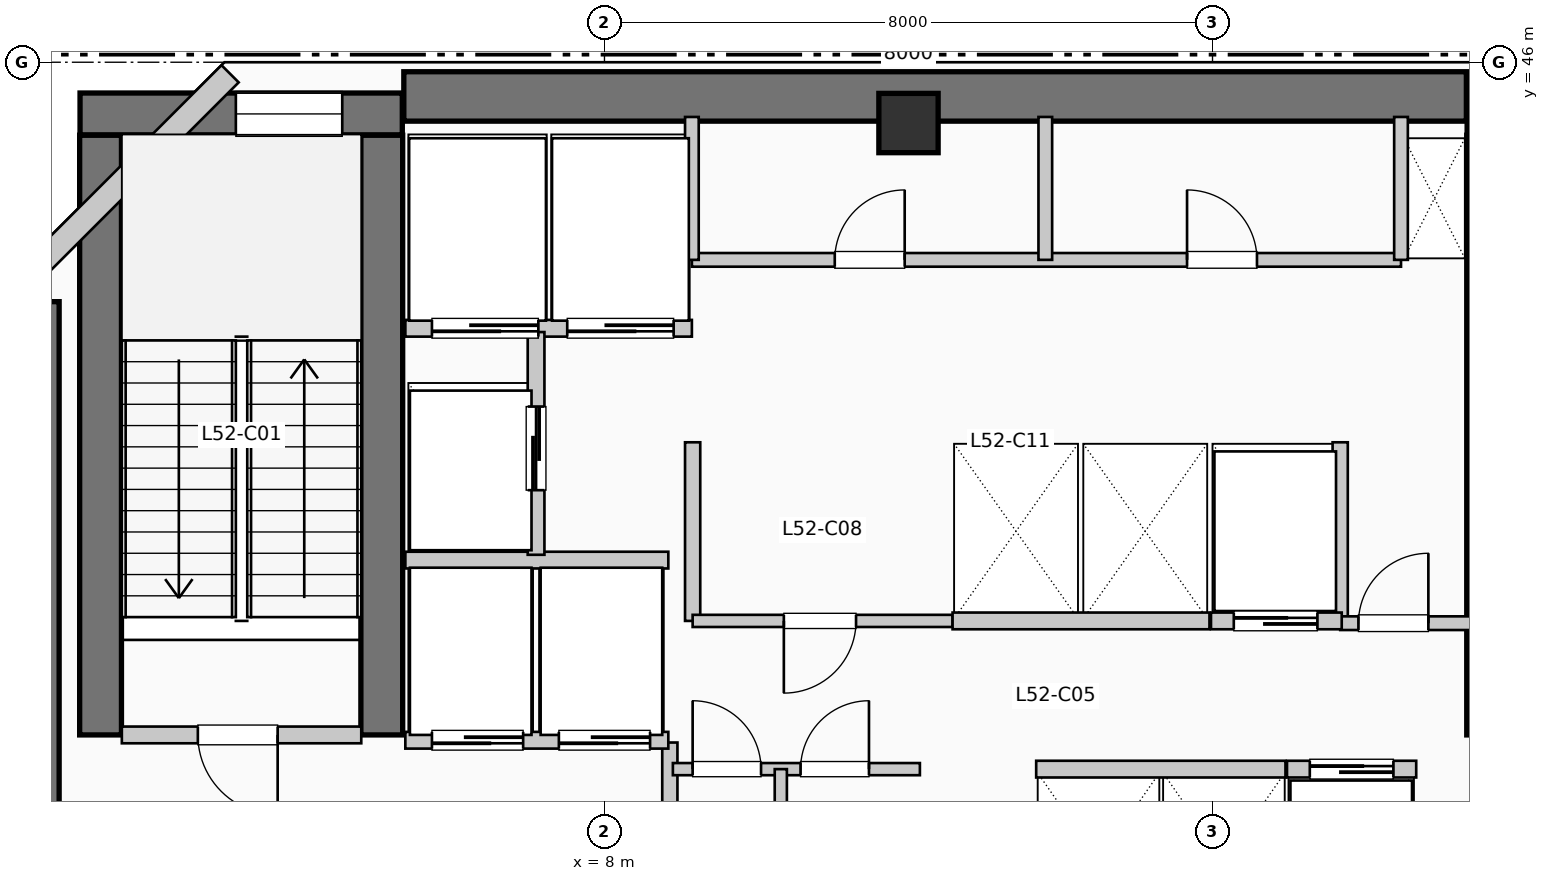
"""IFC4 building model, lengths in metres.
Left out: names, types, materials, properties, quantities, classifications, styles, units other than length and angle.
Written with IfcOpenShell. Run it as: python <this file> out.ifc"""

import sys

from ifc_helpers import new_model, si_unit, direction, frame, frame_2d, origin, origin_2d, place, context, subcontext, project, spatial, rectangle, extrude, element, fill, save


model = new_model("IFC4")
c1 = context("Model", 3, precision=1e-05, world=origin(), true_north=direction((0.0, 1.0)))
c2 = subcontext(c1, "Body", "Model", "MODEL_VIEW")
j1 = project(units=[si_unit("LENGTHUNIT", "METRE"), si_unit("PLANEANGLEUNIT", "RADIAN")], contexts=[c1])
p1 = place(None, origin())
s1 = spatial("IfcSite", under=j1, at=p1, CompositionType="ELEMENT")
p2 = place(p1, origin())
s2 = spatial("IfcBuilding", under=s1, at=p2, CompositionType="ELEMENT")
p3 = place(p2, frame((0.0, 0.0, 215.16)))
s3 = spatial("IfcBuildingStorey", under=s2, at=p3, CompositionType="ELEMENT", Elevation=215.16)
p4 = place(p3, frame((5.36, 45.55, 0.0), z_axis=(0.0, 0.0, 1.0), x_axis=(1.0, 0.0, 0.0)))
e1 = element("IfcWall", 1, at=p4, inside=s3, PredefinedType="SHEAR", context=c2, shape_type="SweptSolid", body=[
    extrude(rectangle(XDim=13.98, YDim=0.65, at=frame_2d((6.99, 0.0))), origin(), (0.0, 0.0, 1.0), 4.62),
])
p5 = place(p3, frame((0.5, 34.95, 0.0), z_axis=(0.0, 0.0, 1.0), x_axis=(0.0, 1.0, 0.0)))
e2 = element("IfcWall", 2, at=p5, inside=s3, PredefinedType="SHEAR", context=c2, shape_type="SweptSolid", body=[
    extrude(rectangle(XDim=7.9, YDim=0.65, at=frame_2d((3.95, 0.0))), origin(), (0.0, 0.0, 1.0), 4.62),
])
for number, where, z_axis, x_axis in (
    (3, (1.37, 37.15, 0.0), (0.0, 0.0, 1.0), (0.0, 1.0, 0.0)),
    (4, (5.07, 37.15, 0.0), (0.0, 0.0, 1.0), (0.0, 1.0, 0.0)),
):
    element("IfcWall", number, at=place(p3, frame(where, z_axis=z_axis, x_axis=x_axis)), inside=s3, PredefinedType="SHEAR", context=c2, shape_type="SweptSolid", body=[
        extrude(rectangle(XDim=7.89, YDim=0.55, at=frame_2d((3.945, 0.0))), origin(), (0.0, 0.0, 1.0), 4.62),
    ])
p6 = place(p3, frame((1.1, 45.32, 0.0), z_axis=(0.0, 0.0, 1.0), x_axis=(1.0, 0.0, 0.0)))
e5 = element("IfcWall", 5, at=p6, inside=s3, PredefinedType="SHEAR", context=c2, shape_type="SweptSolid", body=[
    extrude(rectangle(XDim=4.24, YDim=0.55, at=frame_2d((2.12, 0.0))), origin(), (0.0, 0.0, 1.0), 4.62),
])
p7 = place(p6, frame((2.05, 0.0, 1.05)))
e6 = element("IfcOpeningElement", 6, at=p7, cuts=e5, PredefinedType="OPENING", context=c2, shape_type="SweptSolid", body=[
    extrude(rectangle(XDim=1.4, YDim=1.8, at=frame_2d((0.7, 0.9))), frame((0.0, 0.285, 0.0), z_axis=(0.0, -1.0, 0.0), x_axis=(1.0, 0.0, 0.0)), (0.0, 0.0, 1.0), 0.57),
])
p8 = place(p3, frame((19.62, 37.15, 0.0), z_axis=(0.0, 0.0, 1.0), x_axis=(0.0, 1.0, 0.0)))
e7 = element("IfcWall", 7, at=p8, inside=s3, PredefinedType="SHEAR", context=c2, shape_type="SweptSolid", body=[
    extrude(rectangle(XDim=7.89, YDim=0.55, at=frame_2d((3.945, 0.0))), origin(), (0.0, 0.0, 1.0), 4.62),
])
p9 = place(p3, frame((19.35, 45.32, 0.0), z_axis=(0.0, 0.0, 1.0), x_axis=(1.0, 0.0, 0.0)))
e8 = element("IfcWall", 8, at=p9, inside=s3, PredefinedType="SHEAR", context=c2, shape_type="SweptSolid", body=[
    extrude(rectangle(XDim=3.69, YDim=0.55, at=frame_2d((1.845, 0.0))), origin(), (0.0, 0.0, 1.0), 4.62),
])
p10 = place(p9, frame((1.15, 0.0, 1.05)))
e9 = element("IfcOpeningElement", 9, at=p10, cuts=e8, PredefinedType="OPENING", context=c2, shape_type="SweptSolid", body=[
    extrude(rectangle(XDim=1.4, YDim=1.8, at=frame_2d((0.7, 0.9))), frame((0.0, 0.285, 0.0), z_axis=(0.0, -1.0, 0.0), x_axis=(1.0, 0.0, 0.0)), (0.0, 0.0, 1.0), 0.57),
])
p11 = place(p3, frame((12.0, 45.2, 0.0), z_axis=(0.0, 0.0, 1.0), x_axis=(1.0, 0.0, 0.0)))
e10 = element("IfcColumn", 10, at=p11, inside=s3, PredefinedType="COLUMN", context=c2, shape_type="SweptSolid", body=[
    extrude(rectangle(XDim=0.78, YDim=0.78, at=origin_2d()), origin(), (0.0, 0.0, 1.0), 4.62),
])
p12 = place(p3, frame((3.074, 45.848, 0.0), z_axis=(0.0, 0.0, 1.0), x_axis=(-0.707106781187, -0.707106781187, 0.0)))
e11 = element("IfcWall", 11, at=p12, inside=s3, PredefinedType="SOLIDWALL", context=c2, shape_type="SweptSolid", body=[
    extrude(rectangle(XDim=4.133, YDim=0.32, at=frame_2d((2.066, 0.0))), origin(), (0.0, 0.0, 1.0), 4.37),
])
p13 = place(p3, frame((1.65, 37.15, 0.0), z_axis=(0.0, 0.0, 1.0), x_axis=(1.0, 0.0, 0.0)))
e12 = element("IfcWall", 12, at=p13, inside=s3, PredefinedType="PARTITIONING", context=c2, shape_type="SweptSolid", body=[
    extrude(rectangle(XDim=3.15, YDim=0.22, at=frame_2d((1.575, 0.0))), origin(), (0.0, 0.0, 1.0), 4.37),
])
p14 = place(p13, frame((2.05, 0.0, 0.0), z_axis=(0.0, 0.0, 1.0), x_axis=(-1.0, 0.0, 0.0)))
e13 = element("IfcOpeningElement", 13, at=p14, cuts=e12, PredefinedType="OPENING", context=c2, shape_type="SweptSolid", body=[
    extrude(rectangle(XDim=1.05, YDim=2.15, at=frame_2d((0.525, 1.075))), frame((0.0, 0.12, 0.0), z_axis=(0.0, -1.0, 0.0), x_axis=(1.0, 0.0, 0.0)), (0.0, 0.0, 1.0), 0.24),
])
p15 = place(p3, frame((8.86, 34.55, 0.0), z_axis=(0.0, 0.0, 1.0), x_axis=(0.0, 1.0, 0.0)))
e14 = element("IfcWall", 14, at=p15, inside=s3, PredefinedType="PARTITIONING", context=c2, shape_type="SweptSolid", body=[
    extrude(rectangle(XDim=2.5, YDim=0.2, at=frame_2d((1.25, 0.0))), origin(), (0.0, 0.0, 1.0), 4.37),
])
p16 = place(p3, frame((5.38, 37.08, 0.0), z_axis=(0.0, 0.0, 1.0), x_axis=(1.0, 0.0, 0.0)))
e15 = element("IfcWall", 15, at=p16, inside=s3, PredefinedType="PARTITIONING", context=c2, shape_type="SweptSolid", body=[
    extrude(rectangle(XDim=3.46, YDim=0.22, at=frame_2d((1.73, 0.0))), origin(), (0.0, 0.0, 1.0), 4.37),
])
p17 = place(p16, frame((1.55, 0.0, 0.0), z_axis=(0.0, 0.0, 1.0), x_axis=(-1.0, 0.0, 0.0)))
e16 = element("IfcOpeningElement", 16, at=p17, cuts=e15, PredefinedType="OPENING", context=c2, shape_type="SweptSolid", body=[
    extrude(rectangle(XDim=1.2, YDim=2.2, at=frame_2d((0.6, 1.1))), frame((0.0, 0.12, 0.0), z_axis=(0.0, -1.0, 0.0), x_axis=(1.0, 0.0, 0.0)), (0.0, 0.0, 1.0), 0.24),
])
p18 = place(p16, frame((3.22, 0.0, 0.0), z_axis=(0.0, 0.0, 1.0), x_axis=(-1.0, 0.0, 0.0)))
e17 = element("IfcOpeningElement", 17, at=p18, cuts=e15, PredefinedType="OPENING", context=c2, shape_type="SweptSolid", body=[
    extrude(rectangle(XDim=1.2, YDim=2.2, at=frame_2d((0.6, 1.1))), frame((0.0, 0.12, 0.0), z_axis=(0.0, -1.0, 0.0), x_axis=(1.0, 0.0, 0.0)), (0.0, 0.0, 1.0), 0.24),
])
p19 = place(p3, frame((5.38, 39.45, 0.0), z_axis=(0.0, 0.0, 1.0), x_axis=(1.0, 0.0, 0.0)))
e18 = element("IfcWall", 18, at=p19, inside=s3, PredefinedType="PARTITIONING", context=c2, shape_type="SweptSolid", body=[
    extrude(rectangle(XDim=3.46, YDim=0.22, at=frame_2d((1.73, 0.0))), origin(), (0.0, 0.0, 1.0), 4.37),
])
p20 = place(p3, frame((5.38, 42.5, 0.0), z_axis=(0.0, 0.0, 1.0), x_axis=(1.0, 0.0, 0.0)))
e19 = element("IfcWall", 19, at=p20, inside=s3, PredefinedType="PARTITIONING", context=c2, shape_type="SweptSolid", body=[
    extrude(rectangle(XDim=3.77, YDim=0.22, at=frame_2d((1.885, 0.0))), origin(), (0.0, 0.0, 1.0), 4.37),
])
p21 = place(p20, frame((1.75, 0.0, 0.0), z_axis=(0.0, 0.0, 1.0), x_axis=(-1.0, 0.0, 0.0)))
e20 = element("IfcOpeningElement", 20, at=p21, cuts=e19, PredefinedType="OPENING", context=c2, shape_type="SweptSolid", body=[
    extrude(rectangle(XDim=1.4, YDim=2.2, at=frame_2d((0.7, 1.1))), frame((0.0, 0.12, 0.0), z_axis=(0.0, -1.0, 0.0), x_axis=(1.0, 0.0, 0.0)), (0.0, 0.0, 1.0), 0.24),
])
p22 = place(p20, frame((3.53, 0.0, 0.0), z_axis=(0.0, 0.0, 1.0), x_axis=(-1.0, 0.0, 0.0)))
e21 = element("IfcOpeningElement", 21, at=p22, cuts=e19, PredefinedType="OPENING", context=c2, shape_type="SweptSolid", body=[
    extrude(rectangle(XDim=1.4, YDim=2.2, at=frame_2d((0.7, 1.1))), frame((0.0, 0.12, 0.0), z_axis=(0.0, -1.0, 0.0), x_axis=(1.0, 0.0, 0.0)), (0.0, 0.0, 1.0), 0.24),
])
p23 = place(p3, frame((7.1, 39.52, 0.0), z_axis=(0.0, 0.0, 1.0), x_axis=(0.0, 1.0, 0.0)))
e22 = element("IfcWall", 22, at=p23, inside=s3, PredefinedType="PARTITIONING", context=c2, shape_type="SweptSolid", body=[
    extrude(rectangle(XDim=2.93, YDim=0.22, at=frame_2d((1.465, 0.0))), origin(), (0.0, 0.0, 1.0), 4.37),
])
p24 = place(p23, frame((0.85, 0.0, 0.0)))
e23 = element("IfcOpeningElement", 23, at=p24, cuts=e22, PredefinedType="OPENING", context=c2, shape_type="SweptSolid", body=[
    extrude(rectangle(XDim=1.1, YDim=2.2, at=frame_2d((0.55, 1.1))), frame((0.0, 0.12, 0.0), z_axis=(0.0, -1.0, 0.0), x_axis=(1.0, 0.0, 0.0)), (0.0, 0.0, 1.0), 0.24),
])
for number, where, z_axis, x_axis in (
    (24, (9.16, 38.65, 0.0), (0.0, 0.0, 1.0), (0.0, 1.0, 0.0)),
    (25, (17.68, 38.65, 0.0), (0.0, 0.0, 1.0), (0.0, 1.0, 0.0)),
):
    element("IfcWall", number, at=place(p3, frame(where, z_axis=z_axis, x_axis=x_axis)), inside=s3, PredefinedType="PARTITIONING", context=c2, shape_type="SweptSolid", body=[
        extrude(rectangle(XDim=2.35, YDim=0.2, at=frame_2d((1.175, 0.0))), origin(), (0.0, 0.0, 1.0), 4.37),
    ])
p25 = place(p3, frame((17.68, 38.62, 0.0), z_axis=(0.0, 0.0, 1.0), x_axis=(1.0, 0.0, 0.0)))
e26 = element("IfcWall", 26, at=p25, inside=s3, PredefinedType="PARTITIONING", context=c2, shape_type="SweptSolid", body=[
    extrude(rectangle(XDim=1.84, YDim=0.18, at=frame_2d((0.92, 0.0))), origin(), (0.0, 0.0, 1.0), 4.37),
])
p26 = place(p25, frame((0.24, 0.0, 0.0)))
e27 = element("IfcOpeningElement", 27, at=p26, cuts=e26, PredefinedType="OPENING", context=c2, shape_type="SweptSolid", body=[
    extrude(rectangle(XDim=0.92, YDim=2.1, at=frame_2d((0.46, 1.05))), frame((0.0, 0.1, 0.0), z_axis=(0.0, -1.0, 0.0), x_axis=(1.0, 0.0, 0.0)), (0.0, 0.0, 1.0), 0.2),
])
p27 = place(p3, frame((8.9, 36.7, 0.0), z_axis=(0.0, 0.0, 1.0), x_axis=(1.0, 0.0, 0.0)))
e28 = element("IfcWall", 28, at=p27, inside=s3, PredefinedType="PARTITIONING", context=c2, shape_type="SweptSolid", body=[
    extrude(rectangle(XDim=3.25, YDim=0.16, at=frame_2d((1.625, 0.0))), origin(), (0.0, 0.0, 1.0), 4.37),
])
p28 = place(p27, frame((0.26, 0.0, 0.0)))
e29 = element("IfcOpeningElement", 29, at=p28, cuts=e28, PredefinedType="OPENING", context=c2, shape_type="SweptSolid", body=[
    extrude(rectangle(XDim=0.9, YDim=2.15, at=frame_2d((0.45, 1.075))), frame((0.0, 0.09, 0.0), z_axis=(0.0, -1.0, 0.0), x_axis=(1.0, 0.0, 0.0)), (0.0, 0.0, 1.0), 0.18),
])
p29 = place(p27, frame((1.68, 0.0, 0.0)))
e30 = element("IfcOpeningElement", 30, at=p29, cuts=e28, PredefinedType="OPENING", context=c2, shape_type="SweptSolid", body=[
    extrude(rectangle(XDim=0.9, YDim=2.15, at=frame_2d((0.45, 1.075))), frame((0.0, 0.09, 0.0), z_axis=(0.0, -1.0, 0.0), x_axis=(1.0, 0.0, 0.0)), (0.0, 0.0, 1.0), 0.18),
])
p30 = place(p3, frame((10.32, 34.55, 0.0), z_axis=(0.0, 0.0, 1.0), x_axis=(0.0, 1.0, 0.0)))
e31 = element("IfcWall", 31, at=p30, inside=s3, PredefinedType="PARTITIONING", context=c2, shape_type="SweptSolid", body=[
    extrude(rectangle(XDim=2.15, YDim=0.16, at=frame_2d((1.075, 0.0))), origin(), (0.0, 0.0, 1.0), 4.37),
])
p31 = place(p3, frame((9.16, 38.65, 0.0), z_axis=(0.0, 0.0, 1.0), x_axis=(1.0, 0.0, 0.0)))
e32 = element("IfcWall", 32, at=p31, inside=s3, PredefinedType="PARTITIONING", context=c2, shape_type="SweptSolid", body=[
    extrude(rectangle(XDim=3.42, YDim=0.16, at=frame_2d((1.71, 0.0))), origin(), (0.0, 0.0, 1.0), 4.37),
])
p32 = place(p31, frame((2.15, 0.0, 0.0), z_axis=(0.0, 0.0, 1.0), x_axis=(-1.0, 0.0, 0.0)))
e33 = element("IfcOpeningElement", 33, at=p32, cuts=e32, PredefinedType="OPENING", context=c2, shape_type="SweptSolid", body=[
    extrude(rectangle(XDim=0.95, YDim=2.15, at=frame_2d((0.475, 1.075))), frame((0.0, 0.09, 0.0), z_axis=(0.0, -1.0, 0.0), x_axis=(1.0, 0.0, 0.0)), (0.0, 0.0, 1.0), 0.18),
])
p33 = place(p3, frame((13.68, 36.7, 0.0), z_axis=(0.0, 0.0, 1.0), x_axis=(1.0, 0.0, 0.0)))
e34 = element("IfcWall", 34, at=p33, inside=s3, PredefinedType="PARTITIONING", context=c2, shape_type="SweptSolid", body=[
    extrude(rectangle(XDim=3.28, YDim=0.22, at=frame_2d((1.64, 0.0))), origin(), (0.0, 0.0, 1.0), 4.37),
])
p34 = place(p3, frame((12.58, 38.65, 0.0), z_axis=(0.0, 0.0, 1.0), x_axis=(1.0, 0.0, 0.0)))
e35 = element("IfcWall", 35, at=p34, inside=s3, PredefinedType="PARTITIONING", context=c2, shape_type="SweptSolid", body=[
    extrude(rectangle(XDim=3.38, YDim=0.22, at=frame_2d((1.69, 0.0))), origin(), (0.0, 0.0, 1.0), 4.37),
])
p35 = place(p3, frame((16.98, 36.7, 0.0), z_axis=(0.0, 0.0, 1.0), x_axis=(1.0, 0.0, 0.0)))
e36 = element("IfcWall", 36, at=p35, inside=s3, PredefinedType="PARTITIONING", context=c2, shape_type="SweptSolid", body=[
    extrude(rectangle(XDim=1.7, YDim=0.22, at=frame_2d((0.85, 0.0))), origin(), (0.0, 0.0, 1.0), 4.37),
])
p36 = place(p35, frame((0.3, 0.0, 0.0)))
e37 = element("IfcOpeningElement", 37, at=p36, cuts=e36, PredefinedType="OPENING", context=c2, shape_type="SweptSolid", body=[
    extrude(rectangle(XDim=1.1, YDim=2.2, at=frame_2d((0.55, 1.1))), frame((0.0, 0.12, 0.0), z_axis=(0.0, -1.0, 0.0), x_axis=(1.0, 0.0, 0.0)), (0.0, 0.0, 1.0), 0.24),
])
p37 = place(p3, frame((15.98, 38.65, 0.0), z_axis=(0.0, 0.0, 1.0), x_axis=(1.0, 0.0, 0.0)))
e38 = element("IfcWall", 38, at=p37, inside=s3, PredefinedType="PARTITIONING", context=c2, shape_type="SweptSolid", body=[
    extrude(rectangle(XDim=1.72, YDim=0.22, at=frame_2d((0.86, 0.0))), origin(), (0.0, 0.0, 1.0), 4.37),
])
p38 = place(p37, frame((0.3, 0.0, 0.0)))
e39 = element("IfcOpeningElement", 39, at=p38, cuts=e38, PredefinedType="OPENING", context=c2, shape_type="SweptSolid", body=[
    extrude(rectangle(XDim=1.1, YDim=2.2, at=frame_2d((0.55, 1.1))), frame((0.0, 0.12, 0.0), z_axis=(0.0, -1.0, 0.0), x_axis=(1.0, 0.0, 0.0)), (0.0, 0.0, 1.0), 0.24),
])
p39 = place(p3, frame((9.15, 43.4, 0.0), z_axis=(0.0, 0.0, 1.0), x_axis=(1.0, 0.0, 0.0)))
e40 = element("IfcWall", 40, at=p39, inside=s3, PredefinedType="PLUMBINGWALL", context=c2, shape_type="SweptSolid", body=[
    extrude(rectangle(XDim=9.33, YDim=0.18, at=frame_2d((4.665, 0.0))), origin(), (0.0, 0.0, 1.0), 4.37),
])
p40 = place(p39, frame((1.88, 0.0, 0.0)))
e41 = element("IfcOpeningElement", 41, at=p40, cuts=e40, PredefinedType="OPENING", context=c2, shape_type="SweptSolid", body=[
    extrude(rectangle(XDim=0.92, YDim=2.1, at=frame_2d((0.46, 1.05))), frame((0.0, 0.1, 0.0), z_axis=(0.0, -1.0, 0.0), x_axis=(1.0, 0.0, 0.0)), (0.0, 0.0, 1.0), 0.2),
])
p41 = place(p39, frame((6.515, 0.0, 0.0)))
e42 = element("IfcOpeningElement", 42, at=p41, cuts=e40, PredefinedType="OPENING", context=c2, shape_type="SweptSolid", body=[
    extrude(rectangle(XDim=0.92, YDim=2.1, at=frame_2d((0.46, 1.05))), frame((0.0, 0.1, 0.0), z_axis=(0.0, -1.0, 0.0), x_axis=(1.0, 0.0, 0.0)), (0.0, 0.0, 1.0), 0.2),
])
for number, where, z_axis, x_axis in (
    (43, (9.15, 43.4, 0.0), (0.0, 0.0, 1.0), (0.0, 1.0, 0.0)),
    (44, (18.48, 43.4, 0.0), (0.0, 0.0, 1.0), (0.0, 1.0, 0.0)),
    (45, (13.8, 43.4, 0.0), (0.0, 0.0, 1.0), (0.0, 1.0, 0.0)),
):
    element("IfcWall", number, at=place(p3, frame(where, z_axis=z_axis, x_axis=x_axis)), inside=s3, PredefinedType="PLUMBINGWALL", context=c2, shape_type="SweptSolid", body=[
        extrude(rectangle(XDim=1.88, YDim=0.18, at=frame_2d((0.94, 0.0))), origin(), (0.0, 0.0, 1.0), 4.37),
    ])
p42 = place(p7, origin())
e46 = element("IfcWindow", 46, at=p42, inside=s3, PartitioningType="SINGLE_PANEL", PredefinedType="WINDOW", context=c2, shape_type="SweptSolid", body=[
    extrude(rectangle(XDim=1.4, YDim=1.8, at=frame_2d((0.7, 0.9))), frame((0.0, 0.03, 0.0), z_axis=(0.0, -1.0, 0.0), x_axis=(1.0, 0.0, 0.0)), (0.0, 0.0, 1.0), 0.06),
])
fill(e6, e46)
p43 = place(p14, origin())
e47 = element("IfcDoor", 47, at=p43, inside=s3, OperationType="SINGLE_SWING_RIGHT", PredefinedType="DOOR", context=c2, shape_type="SweptSolid", body=[
    extrude(rectangle(XDim=1.05, YDim=2.15, at=frame_2d((0.525, 1.075))), frame((0.0, 0.025, 0.0), z_axis=(0.0, -1.0, 0.0), x_axis=(1.0, 0.0, 0.0)), (0.0, 0.0, 1.0), 0.05),
])
fill(e13, e47)
p44 = place(p17, origin())
e48 = element("IfcDoor", 48, at=p44, inside=s3, OperationType="SLIDING_TO_RIGHT", PredefinedType="DOOR", context=c2, shape_type="SweptSolid", body=[
    extrude(rectangle(XDim=1.2, YDim=2.2, at=frame_2d((0.6, 1.1))), frame((0.0, 0.025, 0.0), z_axis=(0.0, -1.0, 0.0), x_axis=(1.0, 0.0, 0.0)), (0.0, 0.0, 1.0), 0.05),
])
fill(e16, e48)
p45 = place(p18, origin())
e49 = element("IfcDoor", 49, at=p45, inside=s3, OperationType="SLIDING_TO_RIGHT", PredefinedType="DOOR", context=c2, shape_type="SweptSolid", body=[
    extrude(rectangle(XDim=1.2, YDim=2.2, at=frame_2d((0.6, 1.1))), frame((0.0, 0.025, 0.0), z_axis=(0.0, -1.0, 0.0), x_axis=(1.0, 0.0, 0.0)), (0.0, 0.0, 1.0), 0.05),
])
fill(e17, e49)
p46 = place(p21, origin())
e50 = element("IfcDoor", 50, at=p46, inside=s3, OperationType="SLIDING_TO_LEFT", PredefinedType="DOOR", context=c2, shape_type="SweptSolid", body=[
    extrude(rectangle(XDim=1.4, YDim=2.2, at=frame_2d((0.7, 1.1))), frame((0.0, 0.025, 0.0), z_axis=(0.0, -1.0, 0.0), x_axis=(1.0, 0.0, 0.0)), (0.0, 0.0, 1.0), 0.05),
])
fill(e20, e50)
p47 = place(p22, origin())
e51 = element("IfcDoor", 51, at=p47, inside=s3, OperationType="SLIDING_TO_LEFT", PredefinedType="DOOR", context=c2, shape_type="SweptSolid", body=[
    extrude(rectangle(XDim=1.4, YDim=2.2, at=frame_2d((0.7, 1.1))), frame((0.0, 0.025, 0.0), z_axis=(0.0, -1.0, 0.0), x_axis=(1.0, 0.0, 0.0)), (0.0, 0.0, 1.0), 0.05),
])
fill(e21, e51)
p48 = place(p24, origin())
e52 = element("IfcDoor", 52, at=p48, inside=s3, OperationType="SLIDING_TO_LEFT", PredefinedType="DOOR", context=c2, shape_type="SweptSolid", body=[
    extrude(rectangle(XDim=1.1, YDim=2.2, at=frame_2d((0.55, 1.1))), frame((0.0, 0.025, 0.0), z_axis=(0.0, -1.0, 0.0), x_axis=(1.0, 0.0, 0.0)), (0.0, 0.0, 1.0), 0.05),
])
fill(e23, e52)
p49 = place(p26, origin())
e53 = element("IfcDoor", 53, at=p49, inside=s3, OperationType="SINGLE_SWING_RIGHT", PredefinedType="DOOR", context=c2, shape_type="SweptSolid", body=[
    extrude(rectangle(XDim=0.92, YDim=2.1, at=frame_2d((0.46, 1.05))), frame((0.0, 0.025, 0.0), z_axis=(0.0, -1.0, 0.0), x_axis=(1.0, 0.0, 0.0)), (0.0, 0.0, 1.0), 0.05),
])
fill(e27, e53)
p50 = place(p28, origin())
e54 = element("IfcDoor", 54, at=p50, inside=s3, OperationType="SINGLE_SWING_LEFT", PredefinedType="DOOR", context=c2, shape_type="SweptSolid", body=[
    extrude(rectangle(XDim=0.9, YDim=2.15, at=frame_2d((0.45, 1.075))), frame((0.0, 0.025, 0.0), z_axis=(0.0, -1.0, 0.0), x_axis=(1.0, 0.0, 0.0)), (0.0, 0.0, 1.0), 0.05),
])
fill(e29, e54)
p51 = place(p29, origin())
e55 = element("IfcDoor", 55, at=p51, inside=s3, OperationType="SINGLE_SWING_RIGHT", PredefinedType="DOOR", context=c2, shape_type="SweptSolid", body=[
    extrude(rectangle(XDim=0.9, YDim=2.15, at=frame_2d((0.45, 1.075))), frame((0.0, 0.025, 0.0), z_axis=(0.0, -1.0, 0.0), x_axis=(1.0, 0.0, 0.0)), (0.0, 0.0, 1.0), 0.05),
])
fill(e30, e55)
p52 = place(p32, origin())
e56 = element("IfcDoor", 56, at=p52, inside=s3, OperationType="SINGLE_SWING_LEFT", PredefinedType="DOOR", context=c2, shape_type="SweptSolid", body=[
    extrude(rectangle(XDim=0.95, YDim=2.15, at=frame_2d((0.475, 1.075))), frame((0.0, 0.025, 0.0), z_axis=(0.0, -1.0, 0.0), x_axis=(1.0, 0.0, 0.0)), (0.0, 0.0, 1.0), 0.05),
])
fill(e33, e56)
p53 = place(p36, origin())
e57 = element("IfcDoor", 57, at=p53, inside=s3, OperationType="SLIDING_TO_LEFT", PredefinedType="DOOR", context=c2, shape_type="SweptSolid", body=[
    extrude(rectangle(XDim=1.1, YDim=2.2, at=frame_2d((0.55, 1.1))), frame((0.0, 0.025, 0.0), z_axis=(0.0, -1.0, 0.0), x_axis=(1.0, 0.0, 0.0)), (0.0, 0.0, 1.0), 0.05),
])
fill(e37, e57)
p54 = place(p38, origin())
e58 = element("IfcDoor", 58, at=p54, inside=s3, OperationType="SLIDING_TO_LEFT", PredefinedType="DOOR", context=c2, shape_type="SweptSolid", body=[
    extrude(rectangle(XDim=1.1, YDim=2.2, at=frame_2d((0.55, 1.1))), frame((0.0, 0.025, 0.0), z_axis=(0.0, -1.0, 0.0), x_axis=(1.0, 0.0, 0.0)), (0.0, 0.0, 1.0), 0.05),
])
fill(e39, e58)
p55 = place(p40, origin())
e59 = element("IfcDoor", 59, at=p55, inside=s3, OperationType="SINGLE_SWING_RIGHT", PredefinedType="DOOR", context=c2, shape_type="SweptSolid", body=[
    extrude(rectangle(XDim=0.92, YDim=2.1, at=frame_2d((0.46, 1.05))), frame((0.0, 0.025, 0.0), z_axis=(0.0, -1.0, 0.0), x_axis=(1.0, 0.0, 0.0)), (0.0, 0.0, 1.0), 0.05),
])
fill(e41, e59)
p56 = place(p41, origin())
e60 = element("IfcDoor", 60, at=p56, inside=s3, OperationType="SINGLE_SWING_LEFT", PredefinedType="DOOR", context=c2, shape_type="SweptSolid", body=[
    extrude(rectangle(XDim=0.92, YDim=2.1, at=frame_2d((0.46, 1.05))), frame((0.0, 0.025, 0.0), z_axis=(0.0, -1.0, 0.0), x_axis=(1.0, 0.0, 0.0)), (0.0, 0.0, 1.0), 0.05),
])
fill(e42, e60)
save(model, sys.argv[1])
